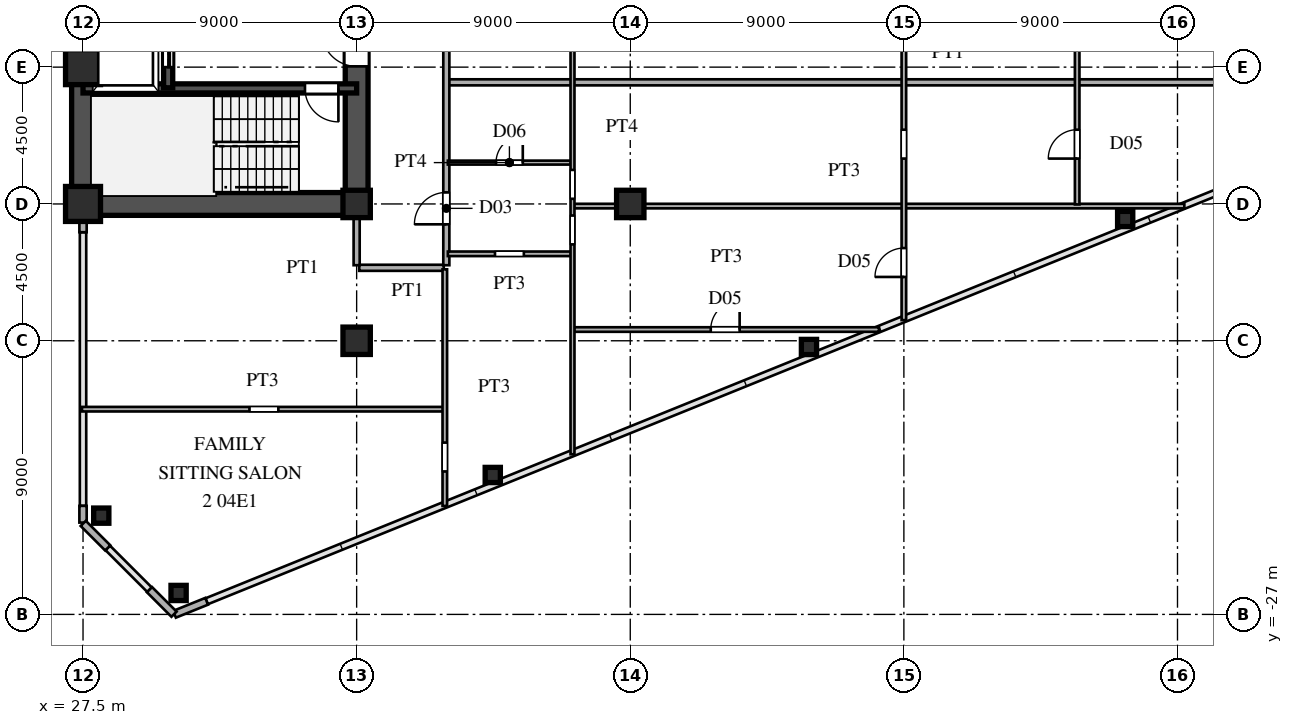
"""IFC4 building model, lengths in metres.
Left out: names, types, materials, properties, quantities, classifications, styles, units other than length and angle.
Written with IfcOpenShell. Run it as: python <this file> out.ifc"""

import sys

from ifc_helpers import new_model, si_unit, direction, frame, frame_2d, origin, origin_2d, place, context, subcontext, project, spatial, rectangle, hollow_rectangle, i_section, extrude, source, transform, mapped, element, fill, save


model = new_model("IFC4")
c1 = context("Model", 3, precision=1e-05, world=origin(), true_north=direction((0.0, 1.0)))
c2 = subcontext(c1, "Body", "Model", "MODEL_VIEW")
j1 = project(units=[si_unit("LENGTHUNIT", "METRE"), si_unit("PLANEANGLEUNIT", "RADIAN")], contexts=[c1])
p1 = place(None, origin())
s1 = spatial("IfcSite", under=j1, at=p1, CompositionType="ELEMENT")
p2 = place(p1, origin())
s2 = spatial("IfcBuilding", under=s1, at=p2, CompositionType="ELEMENT")
p3 = place(p2, frame((0.0, 0.0, 18.9)))
s3 = spatial("IfcBuildingStorey", under=s2, at=p3, CompositionType="ELEMENT", Elevation=18.9)
m1 = source(origin(), c2, "Body", "SweptSolid", [
    extrude(hollow_rectangle(XDim=1.15, YDim=1.15, WallThickness=0.048, at=origin_2d()), origin(), (0.0, 0.0, 1.0), 3.6),
])
for number, where, z_axis, x_axis in (
    (1, (27.5, -13.5, 0.0), (0.0, 0.0, 1.0), (1.0, 0.0, 0.0)),
    (2, (27.5, -9.0, 0.0), (0.0, 0.0, 1.0), (1.0, 0.0, 0.0)),
):
    element("IfcColumn", number, at=place(p3, frame(where, z_axis=z_axis, x_axis=x_axis)), inside=s3, PredefinedType="COLUMN", context=c2, shape_type="MappedRepresentation", body=[
        mapped(m1, transform((0.0, 0.0, 0.0), scale=1.0)),
    ])
m2 = source(origin(), c2, "Body", "SweptSolid", [
    extrude(i_section(OverallWidth=0.9, OverallDepth=0.9, WebThickness=0.036, FlangeThickness=0.055, at=origin_2d()), origin(), (0.0, 0.0, 1.0), 3.6),
])
for number, where, z_axis, x_axis in (
    (3, (36.5, -18.0, 0.0), (0.0, 0.0, 1.0), (1.0, 0.0, 0.0)),
    (4, (36.5, -13.5, 0.0), (0.0, 0.0, 1.0), (1.0, 0.0, 0.0)),
    (5, (45.5, -13.5, 0.0), (0.0, 0.0, 1.0), (1.0, 0.0, 0.0)),
):
    element("IfcColumn", number, at=place(p3, frame(where, z_axis=z_axis, x_axis=x_axis)), inside=s3, PredefinedType="COLUMN", context=c2, shape_type="MappedRepresentation", body=[
        mapped(m2, transform((0.0, 0.0, 0.0), scale=1.0)),
    ])
m3 = source(origin(), c2, "Body", "SweptSolid", [
    extrude(hollow_rectangle(XDim=0.5, YDim=0.5, WallThickness=0.02, at=origin_2d()), origin(), (0.0, 0.0, 1.0), 3.6),
])
for number, where, z_axis, x_axis in (
    (6, (30.643, -26.295, 0.0), (0.0, 0.0, 1.0), (1.0, 0.0, 0.0)),
    (7, (28.1, -23.751, 0.0), (0.0, 0.0, 1.0), (1.0, 0.0, 0.0)),
    (8, (40.977, -22.414, 0.0), (0.0, 0.0, 1.0), (1.0, 0.0, 0.0)),
    (9, (51.378, -18.204, 0.0), (0.0, 0.0, 1.0), (1.0, 0.0, 0.0)),
    (10, (61.779, -13.994, 0.0), (0.0, 0.0, 1.0), (1.0, 0.0, 0.0)),
):
    element("IfcColumn", number, at=place(p3, frame(where, z_axis=z_axis, x_axis=x_axis)), inside=s3, PredefinedType="COLUMN", context=c2, shape_type="MappedRepresentation", body=[
        mapped(m3, transform((0.0, 0.0, 0.0), scale=1.0)),
    ])
p4 = place(p3, frame((30.509, -26.996, 0.0), z_axis=(0.0, 0.0, 1.0), x_axis=(0.927007103665, 0.375043770452, 0.0)))
e11 = element("IfcWall", 11, at=p4, inside=s3, PredefinedType="SOLIDWALL", context=c2, shape_type="SweptSolid", body=[
    extrude(rectangle(XDim=1.14, YDim=0.24, at=frame_2d((0.57, 0.0))), origin(), (0.0, 0.0, 1.0), 3.38),
])
p5 = place(p3, frame((27.5, -23.98, 0.0), z_axis=(0.0, 0.0, 1.0), x_axis=(0.0, 1.0, 0.0)))
e12 = element("IfcWall", 12, at=p5, inside=s3, PredefinedType="SOLIDWALL", context=c2, shape_type="SweptSolid", body=[
    extrude(rectangle(XDim=0.55, YDim=0.24, at=frame_2d((0.275, 0.0))), origin(), (0.0, 0.0, 1.0), 3.38),
])
p6 = place(p3, frame((27.5, -14.43, 0.0), z_axis=(0.0, 0.0, 1.0), x_axis=(0.0, 1.0, 0.0)))
e13 = element("IfcWall", 13, at=p6, inside=s3, PredefinedType="SOLIDWALL", context=c2, shape_type="SweptSolid", body=[
    extrude(rectangle(XDim=0.55, YDim=0.24, at=frame_2d((0.275, 0.0))), origin(), (0.0, 0.0, 1.0), 2.88),
])
for number, where, z_axis, x_axis in (
    (14, (27.507, -24.007, 0.0), (0.0, 0.0, 1.0), (0.707, -0.707, 0.0)),
    (15, (29.687, -26.187, 0.0), (0.0, 0.0, 1.0), (0.707, -0.707, 0.0)),
):
    element("IfcWall", number, at=place(p3, frame(where, z_axis=z_axis, x_axis=x_axis)), inside=s3, PredefinedType="SOLIDWALL", context=c2, shape_type="SweptSolid", body=[
        extrude(rectangle(XDim=1.14, YDim=0.24, at=frame_2d((0.57, 0.0))), origin(), (0.0, 0.0, 1.0), 3.38),
    ])
p7 = place(p3, frame((27.5, -13.5, 0.0), z_axis=(0.0, 0.0, 1.0), x_axis=(0.0, 1.0, 0.0)))
e16 = element("IfcWall", 16, at=p7, inside=s3, PredefinedType="SHEAR", context=c2, shape_type="SweptSolid", body=[
    extrude(rectangle(XDim=12.2, YDim=0.75, at=frame_2d((6.1, 0.0))), origin(), (0.0, 0.0, 1.0), 3.38),
])
p8 = place(p3, frame((27.5, -13.5, 0.0), z_axis=(0.0, 0.0, 1.0), x_axis=(1.0, 0.0, 0.0)))
e17 = element("IfcWall", 17, at=p8, inside=s3, PredefinedType="SHEAR", context=c2, shape_type="SweptSolid", body=[
    extrude(rectangle(XDim=9.0, YDim=0.75, at=frame_2d((4.5, 0.0))), origin(), (0.0, 0.0, 1.0), 3.38),
])
p9 = place(p3, frame((36.5, -13.65, 0.0), z_axis=(0.0, 0.0, 1.0), x_axis=(0.0, 1.0, 0.0)))
e18 = element("IfcWall", 18, at=p9, inside=s3, PredefinedType="SHEAR", context=c2, shape_type="SweptSolid", body=[
    extrude(rectangle(XDim=7.15, YDim=0.75, at=frame_2d((3.575, 0.0))), origin(), (0.0, 0.0, 1.0), 3.38),
])
p10 = place(p9, frame((4.675, 0.0, 0.0)))
e19 = element("IfcOpeningElement", 19, at=p10, cuts=e18, PredefinedType="OPENING", context=c2, shape_type="SweptSolid", body=[
    extrude(rectangle(XDim=1.15, YDim=2.2, at=frame_2d((0.575, 1.1))), frame((0.0, 0.385, 0.0), z_axis=(0.0, -1.0, 0.0), x_axis=(1.0, 0.0, 0.0)), (0.0, 0.0, 1.0), 0.77),
])
p11 = place(p3, frame((27.5, -9.7, 0.0), z_axis=(0.0, 0.0, 1.0), x_axis=(1.0, 0.0, 0.0)))
e20 = element("IfcWall", 20, at=p11, inside=s3, PredefinedType="SHEAR", context=c2, shape_type="SweptSolid", body=[
    extrude(rectangle(XDim=9.0, YDim=0.3, at=frame_2d((4.5, 0.0))), origin(), (0.0, 0.0, 1.0), 3.38),
])
p12 = place(p11, frame((7.3, 0.0, 0.0)))
e21 = element("IfcOpeningElement", 21, at=p12, cuts=e20, PredefinedType="OPENING", context=c2, shape_type="SweptSolid", body=[
    extrude(rectangle(XDim=1.1, YDim=2.2, at=frame_2d((0.55, 1.1))), frame((0.0, 0.16, 0.0), z_axis=(0.0, -1.0, 0.0), x_axis=(1.0, 0.0, 0.0)), (0.0, 0.0, 1.0), 0.32),
])
p13 = place(p3, frame((30.3, -9.68, 0.0), z_axis=(0.0, 0.0, 1.0), x_axis=(0.0, 1.0, 0.0)))
e22 = element("IfcWall", 22, at=p13, inside=s3, PredefinedType="SHEAR", context=c2, shape_type="SweptSolid", body=[
    extrude(rectangle(XDim=2.56, YDim=0.3, at=frame_2d((1.28, 0.0))), origin(), (0.0, 0.0, 1.0), 3.38),
])
p14 = place(p13, frame((0.68, 0.0, 0.0)))
e23 = element("IfcOpeningElement", 23, at=p14, cuts=e22, PredefinedType="OPENING", context=c2, shape_type="SweptSolid", body=[
    extrude(rectangle(XDim=1.2, YDim=2.25, at=frame_2d((0.6, 1.125))), frame((0.0, 0.16, 0.0), z_axis=(0.0, -1.0, 0.0), x_axis=(1.0, 0.0, 0.0)), (0.0, 0.0, 1.0), 0.32),
])
p15 = place(p3, frame((27.465, -20.25, 0.0), z_axis=(0.0, 0.0, 1.0), x_axis=(1.0, 0.0, 0.0)))
e24 = element("IfcWall", 24, at=p15, inside=s3, PredefinedType="PARTITIONING", context=c2, shape_type="SweptSolid", body=[
    extrude(rectangle(XDim=11.885, YDim=0.15, at=frame_2d((5.942, 0.0))), origin(), (0.0, 0.0, 1.0), 3.38),
])
p16 = place(p15, frame((5.51, 0.0, 0.0)))
e25 = element("IfcOpeningElement", 25, at=p16, cuts=e24, PredefinedType="OPENING", context=c2, shape_type="SweptSolid", body=[
    extrude(rectangle(XDim=0.95, YDim=2.15, at=frame_2d((0.475, 1.075))), frame((0.0, 0.085, 0.0), z_axis=(0.0, -1.0, 0.0), x_axis=(1.0, 0.0, 0.0)), (0.0, 0.0, 1.0), 0.17),
])
p17 = place(p3, frame((43.65, -17.63, 0.0), z_axis=(0.0, 0.0, 1.0), x_axis=(1.0, 0.0, 0.0)))
e26 = element("IfcWall", 26, at=p17, inside=s3, PredefinedType="PARTITIONING", context=c2, shape_type="SweptSolid", body=[
    extrude(rectangle(XDim=10.03, YDim=0.15, at=frame_2d((5.015, 0.0))), origin(), (0.0, 0.0, 1.0), 3.38),
])
p18 = place(p17, frame((4.498, 0.0, 0.0)))
e27 = element("IfcOpeningElement", 27, at=p18, cuts=e26, PredefinedType="OPENING", context=c2, shape_type="SweptSolid", body=[
    extrude(rectangle(XDim=0.95, YDim=2.15, at=frame_2d((0.475, 1.075))), frame((0.0, 0.085, 0.0), z_axis=(0.0, -1.0, 0.0), x_axis=(1.0, 0.0, 0.0)), (0.0, 0.0, 1.0), 0.17),
])
p19 = place(p3, frame((36.585, -15.6, 0.0), z_axis=(0.0, 0.0, 1.0), x_axis=(1.0, 0.0, 0.0)))
e28 = element("IfcWall", 28, at=p19, inside=s3, PredefinedType="PARTITIONING", context=c2, shape_type="SweptSolid", body=[
    extrude(rectangle(XDim=2.78, YDim=0.2, at=frame_2d((1.39, 0.0))), origin(), (0.0, 0.0, 1.0), 3.38),
])
p20 = place(p3, frame((39.5, -15.14, 0.0), z_axis=(0.0, 0.0, 1.0), x_axis=(1.0, 0.0, 0.0)))
e29 = element("IfcWall", 29, at=p20, inside=s3, PredefinedType="PARTITIONING", context=c2, shape_type="SweptSolid", body=[
    extrude(rectangle(XDim=4.05, YDim=0.15, at=frame_2d((2.025, 0.0))), origin(), (0.0, 0.0, 1.0), 3.38),
])
p21 = place(p20, frame((1.55, 0.0, 0.0)))
e30 = element("IfcOpeningElement", 30, at=p21, cuts=e29, PredefinedType="OPENING", context=c2, shape_type="SweptSolid", body=[
    extrude(rectangle(XDim=0.95, YDim=2.15, at=frame_2d((0.475, 1.075))), frame((0.0, 0.085, 0.0), z_axis=(0.0, -1.0, 0.0), x_axis=(1.0, 0.0, 0.0)), (0.0, 0.0, 1.0), 0.17),
])
p22 = place(p3, frame((43.65, -13.57, 0.0), z_axis=(0.0, 0.0, 1.0), x_axis=(1.0, 0.0, 0.0)))
e31 = element("IfcWall", 31, at=p22, inside=s3, PredefinedType="PARTITIONING", context=c2, shape_type="SweptSolid", body=[
    extrude(rectangle(XDim=20.075, YDim=0.15, at=frame_2d((10.038, 0.0))), origin(), (0.0, 0.0, 1.0), 2.68),
])
p23 = place(p3, frame((39.5, -12.14, 0.0), z_axis=(0.0, 0.0, 1.0), x_axis=(1.0, 0.0, 0.0)))
e32 = element("IfcWall", 32, at=p23, inside=s3, PredefinedType="PARTITIONING", context=c2, shape_type="SweptSolid", body=[
    extrude(rectangle(XDim=4.05, YDim=0.13, at=frame_2d((2.025, 0.0))), origin(), (0.0, 0.0, 1.0), 3.38),
])
p24 = place(p23, frame((1.585, 0.0, 0.0)))
e33 = element("IfcOpeningElement", 33, at=p24, cuts=e32, PredefinedType="OPENING", context=c2, shape_type="SweptSolid", body=[
    extrude(rectangle(XDim=0.88, YDim=2.1, at=frame_2d((0.44, 1.05))), frame((0.0, 0.075, 0.0), z_axis=(0.0, -1.0, 0.0), x_axis=(1.0, 0.0, 0.0)), (0.0, 0.0, 1.0), 0.15),
])
p25 = place(p3, frame((39.53, -9.5, 0.0), z_axis=(0.0, 0.0, 1.0), x_axis=(1.0, 0.0, 0.0)))
e34 = element("IfcWall", 34, at=p25, inside=s3, PredefinedType="PARTITIONING", context=c2, shape_type="SweptSolid", body=[
    extrude(rectangle(XDim=32.845, YDim=0.2, at=frame_2d((16.422, 0.0))), origin(), (0.0, 0.0, 1.0), 3.38),
])
p26 = place(p3, frame((36.5, -15.515, 0.0), z_axis=(0.0, 0.0, 1.0), x_axis=(0.0, 1.0, 0.0)))
e35 = element("IfcWall", 35, at=p26, inside=s3, PredefinedType="PARTITIONING", context=c2, shape_type="SweptSolid", body=[
    extrude(rectangle(XDim=1.635, YDim=0.2, at=frame_2d((0.817, 0.0))), origin(), (0.0, 0.0, 1.0), 2.68),
])
p27 = place(p3, frame((39.4, -23.433, 0.0), z_axis=(0.0, 0.0, 1.0), x_axis=(0.0, 1.0, 0.0)))
e36 = element("IfcWall", 36, at=p27, inside=s3, PredefinedType="PARTITIONING", context=c2, shape_type="SweptSolid", body=[
    extrude(rectangle(XDim=7.783, YDim=0.15, at=frame_2d((3.892, 0.0))), origin(), (0.0, 0.0, 1.0), 3.38),
])
p28 = place(p27, frame((1.134, 0.0, 0.0)))
e37 = element("IfcOpeningElement", 37, at=p28, cuts=e36, PredefinedType="OPENING", context=c2, shape_type="SweptSolid", body=[
    extrude(rectangle(XDim=0.95, YDim=2.15, at=frame_2d((0.475, 1.075))), frame((0.0, 0.085, 0.0), z_axis=(0.0, -1.0, 0.0), x_axis=(1.0, 0.0, 0.0)), (0.0, 0.0, 1.0), 0.17),
])
p29 = place(p3, frame((39.45, -15.515, 0.0), z_axis=(0.0, 0.0, 1.0), x_axis=(0.0, 1.0, 0.0)))
e38 = element("IfcWall", 38, at=p29, inside=s3, PredefinedType="PARTITIONING", context=c2, shape_type="SweptSolid", body=[
    extrude(rectangle(XDim=31.03, YDim=0.2, at=frame_2d((15.515, 0.0))), origin(), (0.0, 0.0, 1.0), 3.38),
])
p30 = place(p29, frame((1.345, 0.0, 0.0)))
e39 = element("IfcOpeningElement", 39, at=p30, cuts=e38, PredefinedType="OPENING", context=c2, shape_type="SweptSolid", body=[
    extrude(rectangle(XDim=1.05, YDim=2.25, at=frame_2d((0.525, 1.125))), frame((0.0, 0.11, 0.0), z_axis=(0.0, -1.0, 0.0), x_axis=(1.0, 0.0, 0.0)), (0.0, 0.0, 1.0), 0.22),
])
p31 = place(p29, frame((12.28, 0.0, 0.0)))
e40 = element("IfcOpeningElement", 40, at=p31, cuts=e38, PredefinedType="OPENING", context=c2, shape_type="SweptSolid", body=[
    extrude(rectangle(XDim=1.05, YDim=2.25, at=frame_2d((0.525, 1.125))), frame((0.0, 0.11, 0.0), z_axis=(0.0, -1.0, 0.0), x_axis=(1.0, 0.0, 0.0)), (0.0, 0.0, 1.0), 0.22),
])
p32 = place(p29, frame((25.067, 0.0, 0.0)))
e41 = element("IfcOpeningElement", 41, at=p32, cuts=e38, PredefinedType="OPENING", context=c2, shape_type="SweptSolid", body=[
    extrude(rectangle(XDim=1.05, YDim=2.25, at=frame_2d((0.525, 1.125))), frame((0.0, 0.11, 0.0), z_axis=(0.0, -1.0, 0.0), x_axis=(1.0, 0.0, 0.0)), (0.0, 0.0, 1.0), 0.22),
])
p33 = place(p3, frame((43.6, -21.733, 0.0), z_axis=(0.0, 0.0, 1.0), x_axis=(0.0, 1.0, 0.0)))
e42 = element("IfcWall", 42, at=p33, inside=s3, PredefinedType="PARTITIONING", context=c2, shape_type="SweptSolid", body=[
    extrude(rectangle(XDim=21.516, YDim=0.13, at=frame_2d((10.758, 0.0))), origin(), (0.0, 0.0, 1.0), 3.38),
])
p34 = place(p33, frame((6.903, 0.0, 0.0)))
e43 = element("IfcOpeningElement", 43, at=p34, cuts=e42, PredefinedType="OPENING", context=c2, shape_type="SweptSolid", body=[
    extrude(rectangle(XDim=0.95, YDim=2.15, at=frame_2d((0.475, 1.075))), frame((0.0, 0.075, 0.0), z_axis=(0.0, -1.0, 0.0), x_axis=(1.0, 0.0, 0.0)), (0.0, 0.0, 1.0), 0.15),
])
p35 = place(p33, frame((8.403, 0.0, 0.0)))
e44 = element("IfcOpeningElement", 44, at=p35, cuts=e42, PredefinedType="OPENING", context=c2, shape_type="SweptSolid", body=[
    extrude(rectangle(XDim=0.95, YDim=2.15, at=frame_2d((0.475, 1.075))), frame((0.0, 0.075, 0.0), z_axis=(0.0, -1.0, 0.0), x_axis=(1.0, 0.0, 0.0)), (0.0, 0.0, 1.0), 0.15),
])
p36 = place(p33, frame((18.758, 0.0, 0.0)))
e45 = element("IfcOpeningElement", 45, at=p36, cuts=e42, PredefinedType="OPENING", context=c2, shape_type="SweptSolid", body=[
    extrude(rectangle(XDim=0.95, YDim=2.15, at=frame_2d((0.475, 1.075))), frame((0.0, 0.075, 0.0), z_axis=(0.0, -1.0, 0.0), x_axis=(1.0, 0.0, 0.0)), (0.0, 0.0, 1.0), 0.15),
])
p37 = place(p3, frame((54.5, -17.321, 0.0), z_axis=(0.0, 0.0, 1.0), x_axis=(0.0, 1.0, 0.0)))
e46 = element("IfcWall", 46, at=p37, inside=s3, PredefinedType="PARTITIONING", context=c2, shape_type="SweptSolid", body=[
    extrude(rectangle(XDim=33.236, YDim=0.15, at=frame_2d((16.618, 0.0))), origin(), (0.0, 0.0, 1.0), 2.68),
])
p38 = place(p37, frame((1.42, 0.0, 0.0)))
e47 = element("IfcOpeningElement", 47, at=p38, cuts=e46, PredefinedType="OPENING", context=c2, shape_type="SweptSolid", body=[
    extrude(rectangle(XDim=0.95, YDim=2.15, at=frame_2d((0.475, 1.075))), frame((0.0, 0.085, 0.0), z_axis=(0.0, -1.0, 0.0), x_axis=(1.0, 0.0, 0.0)), (0.0, 0.0, 1.0), 0.17),
])
p39 = place(p37, frame((5.313, 0.0, 0.0)))
e48 = element("IfcOpeningElement", 48, at=p39, cuts=e46, PredefinedType="OPENING", context=c2, shape_type="SweptSolid", body=[
    extrude(rectangle(XDim=0.95, YDim=2.15, at=frame_2d((0.475, 1.075))), frame((0.0, 0.085, 0.0), z_axis=(0.0, -1.0, 0.0), x_axis=(1.0, 0.0, 0.0)), (0.0, 0.0, 1.0), 0.17),
])
p40 = place(p37, frame((14.346, 0.0, 0.0)))
e49 = element("IfcOpeningElement", 49, at=p40, cuts=e46, PredefinedType="OPENING", context=c2, shape_type="SweptSolid", body=[
    extrude(rectangle(XDim=0.95, YDim=2.15, at=frame_2d((0.475, 1.075))), frame((0.0, 0.085, 0.0), z_axis=(0.0, -1.0, 0.0), x_axis=(1.0, 0.0, 0.0)), (0.0, 0.0, 1.0), 0.17),
])
p41 = place(p37, frame((24.212, 0.0, 0.0)))
e50 = element("IfcOpeningElement", 50, at=p41, cuts=e46, PredefinedType="OPENING", context=c2, shape_type="SweptSolid", body=[
    extrude(rectangle(XDim=0.95, YDim=2.15, at=frame_2d((0.475, 1.075))), frame((0.0, 0.085, 0.0), z_axis=(0.0, -1.0, 0.0), x_axis=(1.0, 0.0, 0.0)), (0.0, 0.0, 1.0), 0.17),
])
p42 = place(p3, frame((60.2, -13.516, 0.0), z_axis=(0.0, 0.0, 1.0), x_axis=(0.0, 1.0, 0.0)))
e51 = element("IfcWall", 51, at=p42, inside=s3, PredefinedType="PARTITIONING", context=c2, shape_type="SweptSolid", body=[
    extrude(rectangle(XDim=28.53, YDim=0.15, at=frame_2d((14.265, 0.0))), origin(), (0.0, 0.0, 1.0), 3.38),
])
p43 = place(p42, frame((1.508, 0.0, 0.0)))
e52 = element("IfcOpeningElement", 52, at=p43, cuts=e51, PredefinedType="OPENING", context=c2, shape_type="SweptSolid", body=[
    extrude(rectangle(XDim=0.95, YDim=2.15, at=frame_2d((0.475, 1.075))), frame((0.0, 0.085, 0.0), z_axis=(0.0, -1.0, 0.0), x_axis=(1.0, 0.0, 0.0)), (0.0, 0.0, 1.0), 0.17),
])
p44 = place(p42, frame((5.875, 0.0, 0.0)))
e53 = element("IfcOpeningElement", 53, at=p44, cuts=e51, PredefinedType="OPENING", context=c2, shape_type="SweptSolid", body=[
    extrude(rectangle(XDim=0.95, YDim=2.15, at=frame_2d((0.475, 1.075))), frame((0.0, 0.085, 0.0), z_axis=(0.0, -1.0, 0.0), x_axis=(1.0, 0.0, 0.0)), (0.0, 0.0, 1.0), 0.17),
])
p45 = place(p42, frame((10.541, 0.0, 0.0)))
e54 = element("IfcOpeningElement", 54, at=p45, cuts=e51, PredefinedType="OPENING", context=c2, shape_type="SweptSolid", body=[
    extrude(rectangle(XDim=0.95, YDim=2.15, at=frame_2d((0.475, 1.075))), frame((0.0, 0.085, 0.0), z_axis=(0.0, -1.0, 0.0), x_axis=(1.0, 0.0, 0.0)), (0.0, 0.0, 1.0), 0.17),
])
p46 = place(p42, frame((15.208, 0.0, 0.0)))
e55 = element("IfcOpeningElement", 55, at=p46, cuts=e51, PredefinedType="OPENING", context=c2, shape_type="SweptSolid", body=[
    extrude(rectangle(XDim=0.95, YDim=2.15, at=frame_2d((0.475, 1.075))), frame((0.0, 0.085, 0.0), z_axis=(0.0, -1.0, 0.0), x_axis=(1.0, 0.0, 0.0)), (0.0, 0.0, 1.0), 0.17),
])
p47 = place(p42, frame((20.407, 0.0, 0.0)))
e56 = element("IfcOpeningElement", 56, at=p47, cuts=e51, PredefinedType="OPENING", context=c2, shape_type="SweptSolid", body=[
    extrude(rectangle(XDim=0.95, YDim=2.15, at=frame_2d((0.475, 1.075))), frame((0.0, 0.085, 0.0), z_axis=(0.0, -1.0, 0.0), x_axis=(1.0, 0.0, 0.0)), (0.0, 0.0, 1.0), 0.17),
])
m4 = source(origin(), c2, "Body", "SweptSolid", [
    extrude(rectangle(XDim=1.15, YDim=2.2, at=frame_2d((0.575, 1.1))), frame((0.0, 0.025, 0.0), z_axis=(0.0, -1.0, 0.0), x_axis=(1.0, 0.0, 0.0)), (0.0, 0.0, 1.0), 0.05),
])
p48 = place(p10, origin())
e57 = element("IfcDoor", 57, at=p48, inside=s3, OperationType="SINGLE_SWING_RIGHT", PredefinedType="DOOR", context=c2, shape_type="MappedRepresentation", body=[
    mapped(m4, transform((0.0, 0.0, 0.0), scale=1.0)),
])
fill(e19, e57)
m5 = source(origin(), c2, "Body", "SweptSolid", [
    extrude(rectangle(XDim=1.1, YDim=2.2, at=frame_2d((0.55, 1.1))), frame((0.0, 0.025, 0.0), z_axis=(0.0, -1.0, 0.0), x_axis=(1.0, 0.0, 0.0)), (0.0, 0.0, 1.0), 0.05),
])
p49 = place(p12, frame((1.1, 0.0, 0.0), z_axis=(0.0, 0.0, 1.0), x_axis=(-1.0, 0.0, 0.0)))
e58 = element("IfcDoor", 58, at=p49, inside=s3, OperationType="SINGLE_SWING_RIGHT", PredefinedType="DOOR", context=c2, shape_type="MappedRepresentation", body=[
    mapped(m5, transform((0.0, 0.0, 0.0), scale=1.0)),
])
fill(e21, e58)
m6 = source(origin(), c2, "Body", "SweptSolid", [
    extrude(rectangle(XDim=1.2, YDim=2.25, at=frame_2d((0.6, 1.125))), frame((0.0, 0.025, 0.0), z_axis=(0.0, -1.0, 0.0), x_axis=(1.0, 0.0, 0.0)), (0.0, 0.0, 1.0), 0.05),
])
p50 = place(p14, origin())
e59 = element("IfcDoor", 59, at=p50, inside=s3, OperationType="DOUBLE_DOOR_SLIDING", PredefinedType="DOOR", context=c2, shape_type="MappedRepresentation", body=[
    mapped(m6, transform((0.0, 0.0, 0.0), scale=1.0)),
])
fill(e23, e59)
m7 = source(origin(), c2, "Body", "SweptSolid", [
    extrude(rectangle(XDim=0.95, YDim=2.15, at=frame_2d((0.475, 1.075))), frame((0.0, 0.025, 0.0), z_axis=(0.0, -1.0, 0.0), x_axis=(1.0, 0.0, 0.0)), (0.0, 0.0, 1.0), 0.05),
])
p51 = place(p18, origin())
e60 = element("IfcDoor", 60, at=p51, inside=s3, OperationType="SINGLE_SWING_RIGHT", PredefinedType="DOOR", context=c2, shape_type="MappedRepresentation", body=[
    mapped(m7, transform((0.0, 0.0, 0.0), scale=1.0)),
])
fill(e27, e60)
m8 = source(origin(), c2, "Body", "SweptSolid", [
    extrude(rectangle(XDim=0.88, YDim=2.1, at=frame_2d((0.44, 1.05))), frame((0.0, 0.025, 0.0), z_axis=(0.0, -1.0, 0.0), x_axis=(1.0, 0.0, 0.0)), (0.0, 0.0, 1.0), 0.05),
])
p52 = place(p24, origin())
e61 = element("IfcDoor", 61, at=p52, inside=s3, OperationType="SINGLE_SWING_RIGHT", PredefinedType="DOOR", context=c2, shape_type="MappedRepresentation", body=[
    mapped(m8, transform((0.0, 0.0, 0.0), scale=1.0)),
])
fill(e33, e61)
m9 = source(origin(), c2, "Body", "SweptSolid", [
    extrude(rectangle(XDim=1.05, YDim=2.25, at=frame_2d((0.525, 1.125))), frame((0.0, 0.025, 0.0), z_axis=(0.0, -1.0, 0.0), x_axis=(1.0, 0.0, 0.0)), (0.0, 0.0, 1.0), 0.05),
])
p53 = place(p30, origin())
e62 = element("IfcDoor", 62, at=p53, inside=s3, OperationType="SINGLE_SWING_LEFT", PredefinedType="DOOR", context=c2, shape_type="MappedRepresentation", body=[
    mapped(m9, transform((0.0, 0.0, 0.0), scale=1.0)),
])
fill(e39, e62)
p54 = place(p38, origin())
e63 = element("IfcDoor", 63, at=p54, inside=s3, OperationType="SINGLE_SWING_LEFT", PredefinedType="DOOR", context=c2, shape_type="MappedRepresentation", body=[
    mapped(m7, transform((0.0, 0.0, 0.0), scale=1.0)),
])
fill(e47, e63)
p55 = place(p43, origin())
e64 = element("IfcDoor", 64, at=p55, inside=s3, OperationType="SINGLE_SWING_LEFT", PredefinedType="DOOR", context=c2, shape_type="MappedRepresentation", body=[
    mapped(m7, transform((0.0, 0.0, 0.0), scale=1.0)),
])
fill(e52, e64)
save(model, sys.argv[1])
